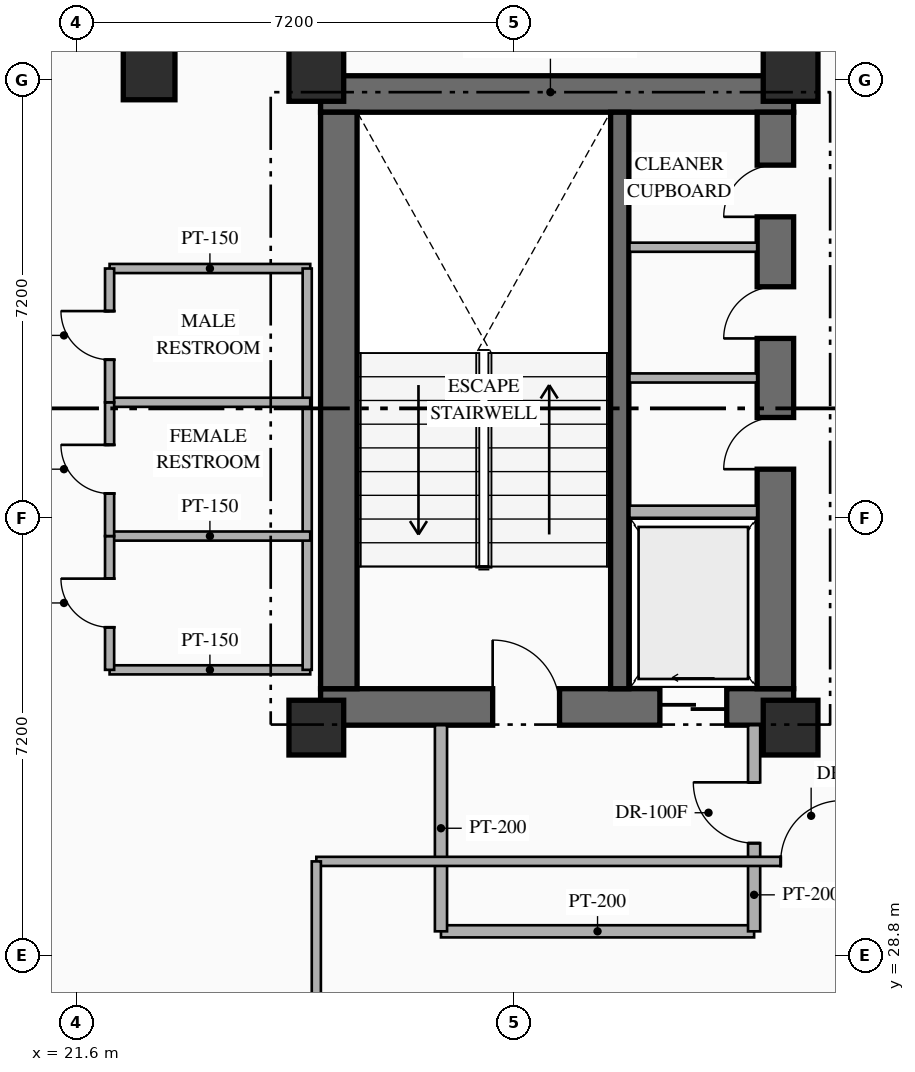
"""IFC4 building model, lengths in metres.
Left out: names, types, materials, properties, quantities, classifications, styles, units other than length and angle.
Written with IfcOpenShell. Run it as: python <this file> out.ifc"""

import sys

from ifc_helpers import new_model, si_unit, direction, frame, frame_2d, origin, origin_2d, place, context, subcontext, project, spatial, rectangle, hollow_rectangle, extrude, element, fill, save


model = new_model("IFC4")
c1 = context("Model", 3, precision=1e-05, world=origin(), true_north=direction((0.0, 1.0)))
c2 = subcontext(c1, "Body", "Model", "MODEL_VIEW")
j1 = project(units=[si_unit("LENGTHUNIT", "METRE"), si_unit("PLANEANGLEUNIT", "RADIAN")], contexts=[c1])
p1 = place(None, origin())
s1 = spatial("IfcSite", under=j1, at=p1, CompositionType="ELEMENT")
p2 = place(p1, origin())
s2 = spatial("IfcBuilding", under=s1, at=p2, CompositionType="ELEMENT")
p3 = place(p2, frame((0.0, 0.0, 104.85)))
s3 = spatial("IfcBuildingStorey", under=s2, at=p3, CompositionType="ELEMENT", Elevation=104.85)
p4 = place(p3, frame((25.62, 32.89, 0.0), z_axis=(0.0, 0.0, 1.0), x_axis=(1.0, 0.0, 0.0)))
e1 = element("IfcWall", 1, at=p4, inside=s3, PredefinedType="SHEAR", context=c2, shape_type="SweptSolid", body=[
    extrude(rectangle(XDim=7.78, YDim=0.6, at=frame_2d((3.89, 0.0))), origin(), (0.0, 0.0, 1.0), 3.6),
])
p5 = place(p4, frame((2.83, 0.0, 0.0)))
e2 = element("IfcOpeningElement", 2, at=p5, cuts=e1, PredefinedType="OPENING", context=c2, shape_type="SweptSolid", body=[
    extrude(rectangle(XDim=1.1, YDim=2.2, at=frame_2d((0.55, 1.1))), frame((0.0, 0.31, 0.0), z_axis=(0.0, -1.0, 0.0), x_axis=(1.0, 0.0, 0.0)), (0.0, 0.0, 1.0), 0.62),
])
p6 = place(p4, frame((5.58, 0.0, 0.0)))
e3 = element("IfcOpeningElement", 3, at=p6, cuts=e1, PredefinedType="OPENING", context=c2, shape_type="SweptSolid", body=[
    extrude(rectangle(XDim=1.1, YDim=2.15, at=frame_2d((0.55, 1.075))), frame((0.0, 0.31, 0.0), z_axis=(0.0, -1.0, 0.0), x_axis=(1.0, 0.0, 0.0)), (0.0, 0.0, 1.0), 0.62),
])
p7 = place(p3, frame((25.62, 42.97, 0.0), z_axis=(0.0, 0.0, 1.0), x_axis=(1.0, 0.0, 0.0)))
e4 = element("IfcWall", 4, at=p7, inside=s3, PredefinedType="SHEAR", context=c2, shape_type="SweptSolid", body=[
    extrude(rectangle(XDim=7.78, YDim=0.6, at=frame_2d((3.89, 0.0))), origin(), (0.0, 0.0, 1.0), 3.6),
])
p8 = place(p3, frame((25.92, 33.19, 0.0), z_axis=(0.0, 0.0, 1.0), x_axis=(0.0, 1.0, 0.0)))
e5 = element("IfcWall", 5, at=p8, inside=s3, PredefinedType="SHEAR", context=c2, shape_type="SweptSolid", body=[
    extrude(rectangle(XDim=9.48, YDim=0.6, at=frame_2d((4.74, 0.0))), origin(), (0.0, 0.0, 1.0), 3.6),
])
p9 = place(p3, frame((33.1, 33.19, 0.0), z_axis=(0.0, 0.0, 1.0), x_axis=(0.0, 1.0, 0.0)))
e6 = element("IfcWall", 6, at=p9, inside=s3, PredefinedType="SHEAR", context=c2, shape_type="SweptSolid", body=[
    extrude(rectangle(XDim=9.48, YDim=0.6, at=frame_2d((4.74, 0.0))), origin(), (0.0, 0.0, 1.0), 3.6),
])
p10 = place(p9, frame((3.61, 0.0, 0.0)))
e7 = element("IfcOpeningElement", 7, at=p10, cuts=e6, PredefinedType="OPENING", context=c2, shape_type="SweptSolid", body=[
    extrude(rectangle(XDim=0.85, YDim=2.08, at=frame_2d((0.425, 1.04))), frame((0.0, 0.31, 0.0), z_axis=(0.0, -1.0, 0.0), x_axis=(1.0, 0.0, 0.0)), (0.0, 0.0, 1.0), 0.62),
])
p11 = place(p9, frame((5.76, 0.0, 0.0)))
e8 = element("IfcOpeningElement", 8, at=p11, cuts=e6, PredefinedType="OPENING", context=c2, shape_type="SweptSolid", body=[
    extrude(rectangle(XDim=0.85, YDim=2.08, at=frame_2d((0.425, 1.04))), frame((0.0, 0.31, 0.0), z_axis=(0.0, -1.0, 0.0), x_axis=(1.0, 0.0, 0.0)), (0.0, 0.0, 1.0), 0.62),
])
p12 = place(p9, frame((7.76, 0.0, 0.0)))
e9 = element("IfcOpeningElement", 9, at=p12, cuts=e6, PredefinedType="OPENING", context=c2, shape_type="SweptSolid", body=[
    extrude(rectangle(XDim=0.85, YDim=2.08, at=frame_2d((0.425, 1.04))), frame((0.0, 0.31, 0.0), z_axis=(0.0, -1.0, 0.0), x_axis=(1.0, 0.0, 0.0)), (0.0, 0.0, 1.0), 0.62),
])
p13 = place(p3, frame((30.54, 33.19, 0.0), z_axis=(0.0, 0.0, 1.0), x_axis=(0.0, 1.0, 0.0)))
e10 = element("IfcWall", 10, at=p13, inside=s3, PredefinedType="SHEAR", context=c2, shape_type="SweptSolid", body=[
    extrude(rectangle(XDim=9.48, YDim=0.3, at=frame_2d((4.74, 0.0))), origin(), (0.0, 0.0, 1.0), 3.6),
])
for number, where, z_axis, x_axis in (
    (11, (25.55, 32.55, 0.0), (0.0, 0.0, 1.0), (1.0, 0.0, 0.0)),
    (12, (33.35, 32.55, 0.0), (0.0, 0.0, 1.0), (1.0, 0.0, 0.0)),
    (13, (25.55, 43.3, 0.0), (0.0, 0.0, 1.0), (1.0, 0.0, 0.0)),
    (14, (33.35, 43.3, 0.0), (0.0, 0.0, 1.0), (1.0, 0.0, 0.0)),
):
    element("IfcColumn", number, at=place(p3, frame(where, z_axis=z_axis, x_axis=x_axis)), inside=s3, PredefinedType="COLUMN", context=c2, shape_type="SweptSolid", body=[
        extrude(rectangle(XDim=0.9, YDim=0.9, at=origin_2d()), origin(), (0.0, 0.0, 1.0), 3.6),
    ])
p14 = place(p3, frame((22.8, 43.3, 0.0), z_axis=(0.0, 0.0, 1.0), x_axis=(1.0, 0.0, 0.0)))
e15 = element("IfcColumn", 15, at=p14, inside=s3, PredefinedType="COLUMN", context=c2, shape_type="SweptSolid", body=[
    extrude(hollow_rectangle(XDim=0.85, YDim=0.85, WallThickness=0.032, at=origin_2d()), origin(), (0.0, 0.0, 1.0), 3.6),
])
p15 = place(p3, frame((30.7, 36.1, 0.0), z_axis=(0.0, 0.0, 1.0), x_axis=(1.0, 0.0, 0.0)))
e16 = element("IfcWall", 16, at=p15, inside=s3, PredefinedType="STANDARD", context=c2, shape_type="SweptSolid", body=[
    extrude(rectangle(XDim=2.1, YDim=0.2, at=frame_2d((1.05, 0.0))), origin(), (0.0, 0.0, 1.0), 3.35),
])
for number, where, z_axis, x_axis in (
    (17, (30.7, 38.3, 0.0), (0.0, 0.0, 1.0), (1.0, 0.0, 0.0)),
    (18, (30.7, 40.45, 0.0), (0.0, 0.0, 1.0), (1.0, 0.0, 0.0)),
):
    element("IfcWall", number, at=place(p3, frame(where, z_axis=z_axis, x_axis=x_axis)), inside=s3, PredefinedType="PARTITIONING", context=c2, shape_type="SweptSolid", body=[
        extrude(rectangle(XDim=2.1, YDim=0.15, at=frame_2d((1.05, 0.0))), origin(), (0.0, 0.0, 1.0), 3.35),
    ])
p16 = place(p3, frame((27.6, 29.2, 0.0), z_axis=(0.0, 0.0, 1.0), x_axis=(1.0, 0.0, 0.0)))
e19 = element("IfcWall", 19, at=p16, inside=s3, PredefinedType="STANDARD", context=c2, shape_type="SweptSolid", body=[
    extrude(rectangle(XDim=5.15, YDim=0.2, at=frame_2d((2.575, 0.0))), origin(), (0.0, 0.0, 1.0), 3.35),
])
p17 = place(p3, frame((27.6, 29.2, 0.0), z_axis=(0.0, 0.0, 1.0), x_axis=(0.0, 1.0, 0.0)))
e20 = element("IfcWall", 20, at=p17, inside=s3, PredefinedType="STANDARD", context=c2, shape_type="SweptSolid", body=[
    extrude(rectangle(XDim=3.39, YDim=0.2, at=frame_2d((1.695, 0.0))), origin(), (0.0, 0.0, 1.0), 3.35),
])
p18 = place(p3, frame((32.75, 29.2, 0.0), z_axis=(0.0, 0.0, 1.0), x_axis=(0.0, 1.0, 0.0)))
e21 = element("IfcWall", 21, at=p18, inside=s3, PredefinedType="STANDARD", context=c2, shape_type="SweptSolid", body=[
    extrude(rectangle(XDim=3.39, YDim=0.2, at=frame_2d((1.695, 0.0))), origin(), (0.0, 0.0, 1.0), 3.35),
])
p19 = place(p18, frame((1.45, 0.0, 0.0)))
e22 = element("IfcOpeningElement", 22, at=p19, cuts=e21, PredefinedType="OPENING", context=c2, shape_type="SweptSolid", body=[
    extrude(rectangle(XDim=1.0, YDim=2.2, at=frame_2d((0.5, 1.1))), frame((0.0, 0.11, 0.0), z_axis=(0.0, -1.0, 0.0), x_axis=(1.0, 0.0, 0.0)), (0.0, 0.0, 1.0), 0.22),
])
for number, where, z_axis, x_axis in (
    (23, (22.15, 33.5, 0.0), (0.0, 0.0, 1.0), (1.0, 0.0, 0.0)),
    (24, (22.15, 40.1, 0.0), (0.0, 0.0, 1.0), (1.0, 0.0, 0.0)),
):
    element("IfcWall", number, at=place(p3, frame(where, z_axis=z_axis, x_axis=x_axis)), inside=s3, PredefinedType="PARTITIONING", context=c2, shape_type="SweptSolid", body=[
        extrude(rectangle(XDim=3.3, YDim=0.15, at=frame_2d((1.65, 0.0))), origin(), (0.0, 0.0, 1.0), 3.35),
    ])
p20 = place(p3, frame((25.4, 33.5, 0.0), z_axis=(0.0, 0.0, 1.0), x_axis=(0.0, 1.0, 0.0)))
e25 = element("IfcWall", 25, at=p20, inside=s3, PredefinedType="PARTITIONING", context=c2, shape_type="SweptSolid", body=[
    extrude(rectangle(XDim=6.6, YDim=0.15, at=frame_2d((3.3, 0.0))), origin(), (0.0, 0.0, 1.0), 3.35),
])
for number, where, z_axis, x_axis in (
    (26, (22.15, 35.7, 0.0), (0.0, 0.0, 1.0), (1.0, 0.0, 0.0)),
    (27, (22.15, 37.9, 0.0), (0.0, 0.0, 1.0), (1.0, 0.0, 0.0)),
):
    element("IfcWall", number, at=place(p3, frame(where, z_axis=z_axis, x_axis=x_axis)), inside=s3, PredefinedType="PARTITIONING", context=c2, shape_type="SweptSolid", body=[
        extrude(rectangle(XDim=3.3, YDim=0.15, at=frame_2d((1.65, 0.0))), origin(), (0.0, 0.0, 1.0), 3.35),
    ])
p21 = place(p3, frame((22.15, 33.5, 0.0), z_axis=(0.0, 0.0, 1.0), x_axis=(0.0, 1.0, 0.0)))
e28 = element("IfcWall", 28, at=p21, inside=s3, PredefinedType="PARTITIONING", context=c2, shape_type="SweptSolid", body=[
    extrude(rectangle(XDim=2.2, YDim=0.15, at=frame_2d((1.1, 0.0))), origin(), (0.0, 0.0, 1.0), 3.35),
])
p22 = place(p21, frame((0.7, 0.0, 0.0)))
e29 = element("IfcOpeningElement", 29, at=p22, cuts=e28, PredefinedType="OPENING", context=c2, shape_type="SweptSolid", body=[
    extrude(rectangle(XDim=0.8, YDim=2.06, at=frame_2d((0.4, 1.03))), frame((0.0, 0.085, 0.0), z_axis=(0.0, -1.0, 0.0), x_axis=(1.0, 0.0, 0.0)), (0.0, 0.0, 1.0), 0.17),
])
p23 = place(p3, frame((22.15, 35.7, 0.0), z_axis=(0.0, 0.0, 1.0), x_axis=(0.0, 1.0, 0.0)))
e30 = element("IfcWall", 30, at=p23, inside=s3, PredefinedType="PARTITIONING", context=c2, shape_type="SweptSolid", body=[
    extrude(rectangle(XDim=2.2, YDim=0.15, at=frame_2d((1.1, 0.0))), origin(), (0.0, 0.0, 1.0), 3.35),
])
p24 = place(p23, frame((0.7, 0.0, 0.0)))
e31 = element("IfcOpeningElement", 31, at=p24, cuts=e30, PredefinedType="OPENING", context=c2, shape_type="SweptSolid", body=[
    extrude(rectangle(XDim=0.8, YDim=2.06, at=frame_2d((0.4, 1.03))), frame((0.0, 0.085, 0.0), z_axis=(0.0, -1.0, 0.0), x_axis=(1.0, 0.0, 0.0)), (0.0, 0.0, 1.0), 0.17),
])
p25 = place(p3, frame((22.15, 37.9, 0.0), z_axis=(0.0, 0.0, 1.0), x_axis=(0.0, 1.0, 0.0)))
e32 = element("IfcWall", 32, at=p25, inside=s3, PredefinedType="PARTITIONING", context=c2, shape_type="SweptSolid", body=[
    extrude(rectangle(XDim=2.2, YDim=0.15, at=frame_2d((1.1, 0.0))), origin(), (0.0, 0.0, 1.0), 3.35),
])
p26 = place(p25, frame((0.7, 0.0, 0.0)))
e33 = element("IfcOpeningElement", 33, at=p26, cuts=e32, PredefinedType="OPENING", context=c2, shape_type="SweptSolid", body=[
    extrude(rectangle(XDim=0.8, YDim=2.06, at=frame_2d((0.4, 1.03))), frame((0.0, 0.085, 0.0), z_axis=(0.0, -1.0, 0.0), x_axis=(1.0, 0.0, 0.0)), (0.0, 0.0, 1.0), 0.17),
])
p27 = place(p3, frame((25.55, 30.35, 0.0), z_axis=(0.0, 0.0, 1.0), x_axis=(1.0, 0.0, 0.0)))
e34 = element("IfcWall", 34, at=p27, inside=s3, PredefinedType="PARTITIONING", context=c2, shape_type="SweptSolid", body=[
    extrude(rectangle(XDim=9.4, YDim=0.15, at=frame_2d((4.7, 0.0))), origin(), (0.0, 0.0, 1.0), 3.35),
])
p28 = place(p27, frame((7.638, 0.0, 0.0)))
e35 = element("IfcOpeningElement", 35, at=p28, cuts=e34, PredefinedType="OPENING", context=c2, shape_type="SweptSolid", body=[
    extrude(rectangle(XDim=1.0, YDim=2.15, at=frame_2d((0.5, 1.075))), frame((0.0, 0.085, 0.0), z_axis=(0.0, -1.0, 0.0), x_axis=(1.0, 0.0, 0.0)), (0.0, 0.0, 1.0), 0.17),
])
p29 = place(p3, frame((25.55, 23.2, 0.0), z_axis=(0.0, 0.0, 1.0), x_axis=(0.0, 1.0, 0.0)))
e36 = element("IfcWall", 36, at=p29, inside=s3, PredefinedType="PARTITIONING", context=c2, shape_type="SweptSolid", body=[
    extrude(rectangle(XDim=7.15, YDim=0.15, at=frame_2d((3.575, 0.0))), origin(), (0.0, 0.0, 1.0), 2.695),
])
p30 = place(p5, origin())
e37 = element("IfcDoor", 37, at=p30, inside=s3, OperationType="SINGLE_SWING_LEFT", PredefinedType="DOOR", context=c2, shape_type="SweptSolid", body=[
    extrude(rectangle(XDim=1.1, YDim=2.2, at=frame_2d((0.55, 1.1))), frame((0.0, 0.025, 0.0), z_axis=(0.0, -1.0, 0.0), x_axis=(1.0, 0.0, 0.0)), (0.0, 0.0, 1.0), 0.05),
])
fill(e2, e37)
p31 = place(p6, origin())
e38 = element("IfcDoor", 38, at=p31, inside=s3, OperationType="SLIDING_TO_LEFT", PredefinedType="USERDEFINED", context=c2, shape_type="SweptSolid", body=[
    extrude(rectangle(XDim=1.1, YDim=2.15, at=frame_2d((0.55, 1.075))), frame((0.0, 0.025, 0.0), z_axis=(0.0, -1.0, 0.0), x_axis=(1.0, 0.0, 0.0)), (0.0, 0.0, 1.0), 0.05),
])
fill(e3, e38)
p32 = place(p10, origin())
e39 = element("IfcDoor", 39, at=p32, inside=s3, OperationType="SINGLE_SWING_LEFT", PredefinedType="DOOR", context=c2, shape_type="SweptSolid", body=[
    extrude(rectangle(XDim=0.85, YDim=2.08, at=frame_2d((0.425, 1.04))), frame((0.0, 0.025, 0.0), z_axis=(0.0, -1.0, 0.0), x_axis=(1.0, 0.0, 0.0)), (0.0, 0.0, 1.0), 0.05),
])
fill(e7, e39)
p33 = place(p11, origin())
e40 = element("IfcDoor", 40, at=p33, inside=s3, OperationType="SINGLE_SWING_LEFT", PredefinedType="DOOR", context=c2, shape_type="SweptSolid", body=[
    extrude(rectangle(XDim=0.85, YDim=2.08, at=frame_2d((0.425, 1.04))), frame((0.0, 0.025, 0.0), z_axis=(0.0, -1.0, 0.0), x_axis=(1.0, 0.0, 0.0)), (0.0, 0.0, 1.0), 0.05),
])
fill(e8, e40)
p34 = place(p12, origin())
e41 = element("IfcDoor", 41, at=p34, inside=s3, OperationType="SINGLE_SWING_LEFT", PredefinedType="DOOR", context=c2, shape_type="SweptSolid", body=[
    extrude(rectangle(XDim=0.85, YDim=2.08, at=frame_2d((0.425, 1.04))), frame((0.0, 0.025, 0.0), z_axis=(0.0, -1.0, 0.0), x_axis=(1.0, 0.0, 0.0)), (0.0, 0.0, 1.0), 0.05),
])
fill(e9, e41)
p35 = place(p19, origin())
e42 = element("IfcDoor", 42, at=p35, inside=s3, OperationType="SINGLE_SWING_RIGHT", PredefinedType="DOOR", context=c2, shape_type="SweptSolid", body=[
    extrude(rectangle(XDim=1.0, YDim=2.2, at=frame_2d((0.5, 1.1))), frame((0.0, 0.025, 0.0), z_axis=(0.0, -1.0, 0.0), x_axis=(1.0, 0.0, 0.0)), (0.0, 0.0, 1.0), 0.05),
])
fill(e22, e42)
p36 = place(p22, origin())
e43 = element("IfcDoor", 43, at=p36, inside=s3, OperationType="SINGLE_SWING_RIGHT", PredefinedType="DOOR", context=c2, shape_type="SweptSolid", body=[
    extrude(rectangle(XDim=0.8, YDim=2.06, at=frame_2d((0.4, 1.03))), frame((0.0, 0.025, 0.0), z_axis=(0.0, -1.0, 0.0), x_axis=(1.0, 0.0, 0.0)), (0.0, 0.0, 1.0), 0.05),
])
fill(e29, e43)
p37 = place(p24, origin())
e44 = element("IfcDoor", 44, at=p37, inside=s3, OperationType="SINGLE_SWING_RIGHT", PredefinedType="DOOR", context=c2, shape_type="SweptSolid", body=[
    extrude(rectangle(XDim=0.8, YDim=2.06, at=frame_2d((0.4, 1.03))), frame((0.0, 0.025, 0.0), z_axis=(0.0, -1.0, 0.0), x_axis=(1.0, 0.0, 0.0)), (0.0, 0.0, 1.0), 0.05),
])
fill(e31, e44)
p38 = place(p26, origin())
e45 = element("IfcDoor", 45, at=p38, inside=s3, OperationType="SINGLE_SWING_RIGHT", PredefinedType="DOOR", context=c2, shape_type="SweptSolid", body=[
    extrude(rectangle(XDim=0.8, YDim=2.06, at=frame_2d((0.4, 1.03))), frame((0.0, 0.025, 0.0), z_axis=(0.0, -1.0, 0.0), x_axis=(1.0, 0.0, 0.0)), (0.0, 0.0, 1.0), 0.05),
])
fill(e33, e45)
p39 = place(p28, origin())
e46 = element("IfcDoor", 46, at=p39, inside=s3, OperationType="SINGLE_SWING_RIGHT", PredefinedType="DOOR", context=c2, shape_type="SweptSolid", body=[
    extrude(rectangle(XDim=1.0, YDim=2.15, at=frame_2d((0.5, 1.075))), frame((0.0, 0.025, 0.0), z_axis=(0.0, -1.0, 0.0), x_axis=(1.0, 0.0, 0.0)), (0.0, 0.0, 1.0), 0.05),
])
fill(e35, e46)
save(model, sys.argv[1])
